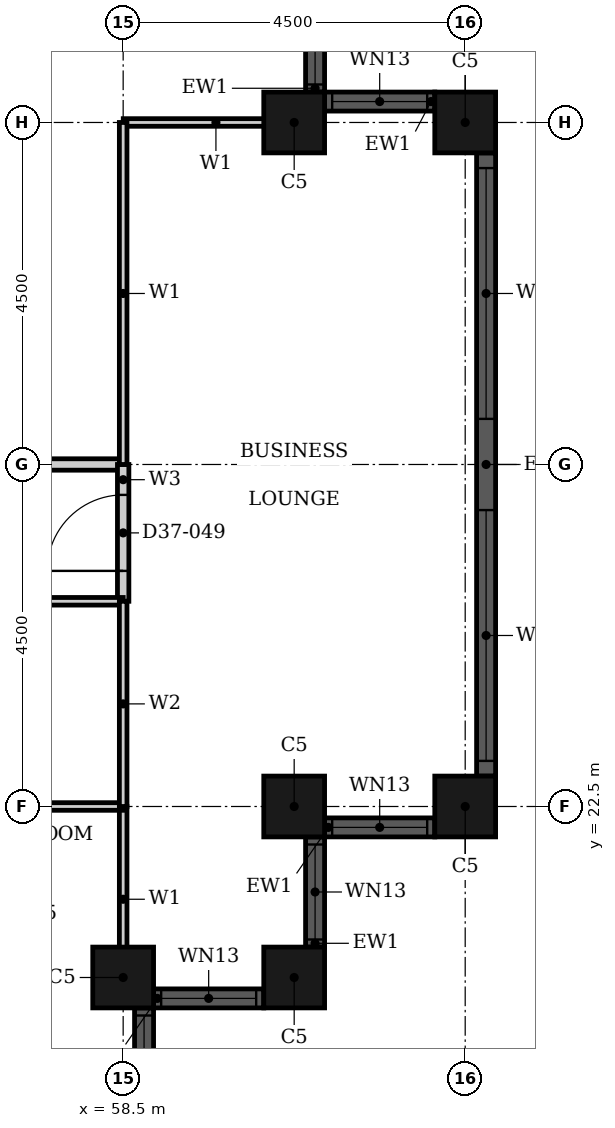
"""IFC4 building model, lengths in metres.
Left out: names, types, materials, properties, quantities, classifications, styles, units other than length and angle.
Written with IfcOpenShell. Run it as: python <this file> out.ifc"""

import sys

from ifc_helpers import new_model, si_unit, direction, frame, frame_2d, origin, origin_2d, place, context, subcontext, project, spatial, rectangle, hollow_rectangle, extrude, element, fill, save


model = new_model("IFC4")
c1 = context("Model", 3, precision=1e-05, world=origin(), true_north=direction((0.0, 1.0)))
c2 = subcontext(c1, "Body", "Model", "MODEL_VIEW")
j1 = project(units=[si_unit("LENGTHUNIT", "METRE"), si_unit("PLANEANGLEUNIT", "RADIAN")], contexts=[c1])
p1 = place(None, origin())
s1 = spatial("IfcSite", under=j1, at=p1, CompositionType="ELEMENT")
p2 = place(p1, origin())
s2 = spatial("IfcBuilding", under=s1, at=p2, CompositionType="ELEMENT")
p3 = place(p2, frame((0.0, 0.0, 150.6)))
s3 = spatial("IfcBuildingStorey", under=s2, at=p3, CompositionType="ELEMENT", Elevation=150.6)
for number, where, z_axis, x_axis in (
    (1, (58.5, 20.25, 0.0), (0.0, 0.0, 1.0), (1.0, 0.0, 0.0)),
    (2, (60.75, 20.25, 0.0), (0.0, 0.0, 1.0), (1.0, 0.0, 0.0)),
    (3, (60.75, 22.5, 0.0), (0.0, 0.0, 1.0), (1.0, 0.0, 0.0)),
    (4, (63.0, 22.5, 0.0), (0.0, 0.0, 1.0), (1.0, 0.0, 0.0)),
    (5, (63.0, 31.5, 0.0), (0.0, 0.0, 1.0), (1.0, 0.0, 0.0)),
    (6, (60.75, 31.5, 0.0), (0.0, 0.0, 1.0), (1.0, 0.0, 0.0)),
):
    element("IfcColumn", number, at=place(p3, frame(where, z_axis=z_axis, x_axis=x_axis)), inside=s3, PredefinedType="COLUMN", context=c2, shape_type="SweptSolid", body=[
        extrude(hollow_rectangle(XDim=0.8, YDim=0.8, WallThickness=0.025, at=origin_2d()), origin(), (0.0, 0.0, 1.0), 3.7),
    ])
p4 = place(p3, frame((58.775, 18.4, 0.0), z_axis=(0.0, 0.0, 1.0), x_axis=(0.0, 1.0, 0.0)))
e7 = element("IfcWall", 7, at=p4, inside=s3, PredefinedType="SOLIDWALL", context=c2, shape_type="SweptSolid", body=[
    extrude(rectangle(XDim=1.45, YDim=0.25, at=frame_2d((0.725, 0.0))), origin(), (0.0, 0.0, 1.0), 3.7),
])
p5 = place(p4, frame((0.1, 0.0, 0.9)))
e8 = element("IfcOpeningElement", 8, at=p5, cuts=e7, PredefinedType="OPENING", context=c2, shape_type="SweptSolid", body=[
    extrude(rectangle(XDim=1.25, YDim=1.85, at=frame_2d((0.625, 0.925))), frame((0.0, 0.135, 0.0), z_axis=(0.0, -1.0, 0.0), x_axis=(1.0, 0.0, 0.0)), (0.0, 0.0, 1.0), 0.27),
])
p6 = place(p3, frame((58.9, 19.975, 0.0), z_axis=(0.0, 0.0, 1.0), x_axis=(1.0, 0.0, 0.0)))
e9 = element("IfcWall", 9, at=p6, inside=s3, PredefinedType="SOLIDWALL", context=c2, shape_type="SweptSolid", body=[
    extrude(rectangle(XDim=1.45, YDim=0.25, at=frame_2d((0.725, 0.0))), origin(), (0.0, 0.0, 1.0), 3.7),
])
p7 = place(p6, frame((0.1, 0.0, 0.9)))
e10 = element("IfcOpeningElement", 10, at=p7, cuts=e9, PredefinedType="OPENING", context=c2, shape_type="SweptSolid", body=[
    extrude(rectangle(XDim=1.25, YDim=1.85, at=frame_2d((0.625, 0.925))), frame((0.0, 0.135, 0.0), z_axis=(0.0, -1.0, 0.0), x_axis=(1.0, 0.0, 0.0)), (0.0, 0.0, 1.0), 0.27),
])
p8 = place(p3, frame((61.025, 20.65, 0.0), z_axis=(0.0, 0.0, 1.0), x_axis=(0.0, 1.0, 0.0)))
e11 = element("IfcWall", 11, at=p8, inside=s3, PredefinedType="SOLIDWALL", context=c2, shape_type="SweptSolid", body=[
    extrude(rectangle(XDim=1.45, YDim=0.25, at=frame_2d((0.725, 0.0))), origin(), (0.0, 0.0, 1.0), 3.7),
])
p9 = place(p8, frame((0.1, 0.0, 0.9)))
e12 = element("IfcOpeningElement", 12, at=p9, cuts=e11, PredefinedType="OPENING", context=c2, shape_type="SweptSolid", body=[
    extrude(rectangle(XDim=1.25, YDim=1.85, at=frame_2d((0.625, 0.925))), frame((0.0, 0.135, 0.0), z_axis=(0.0, -1.0, 0.0), x_axis=(1.0, 0.0, 0.0)), (0.0, 0.0, 1.0), 0.27),
])
p10 = place(p3, frame((61.15, 22.225, 0.0), z_axis=(0.0, 0.0, 1.0), x_axis=(1.0, 0.0, 0.0)))
e13 = element("IfcWall", 13, at=p10, inside=s3, PredefinedType="SOLIDWALL", context=c2, shape_type="SweptSolid", body=[
    extrude(rectangle(XDim=1.45, YDim=0.25, at=frame_2d((0.725, 0.0))), origin(), (0.0, 0.0, 1.0), 3.7),
])
p11 = place(p10, frame((0.1, 0.0, 0.9)))
e14 = element("IfcOpeningElement", 14, at=p11, cuts=e13, PredefinedType="OPENING", context=c2, shape_type="SweptSolid", body=[
    extrude(rectangle(XDim=1.25, YDim=1.85, at=frame_2d((0.625, 0.925))), frame((0.0, 0.135, 0.0), z_axis=(0.0, -1.0, 0.0), x_axis=(1.0, 0.0, 0.0)), (0.0, 0.0, 1.0), 0.27),
])
p12 = place(p3, frame((63.275, 22.9, 0.0), z_axis=(0.0, 0.0, 1.0), x_axis=(0.0, 1.0, 0.0)))
e15 = element("IfcWall", 15, at=p12, inside=s3, PredefinedType="SOLIDWALL", context=c2, shape_type="SweptSolid", body=[
    extrude(rectangle(XDim=8.2, YDim=0.25, at=frame_2d((4.1, 0.0))), origin(), (0.0, 0.0, 1.0), 3.7),
])
p13 = place(p12, frame((0.2, 0.0, 0.45)))
e16 = element("IfcOpeningElement", 16, at=p13, cuts=e15, PredefinedType="OPENING", context=c2, shape_type="SweptSolid", body=[
    extrude(rectangle(XDim=3.3, YDim=2.3, at=frame_2d((1.65, 1.15))), frame((0.0, 0.135, 0.0), z_axis=(0.0, -1.0, 0.0), x_axis=(1.0, 0.0, 0.0)), (0.0, 0.0, 1.0), 0.27),
])
p14 = place(p12, frame((4.7, 0.0, 0.45)))
e17 = element("IfcOpeningElement", 17, at=p14, cuts=e15, PredefinedType="OPENING", context=c2, shape_type="SweptSolid", body=[
    extrude(rectangle(XDim=3.3, YDim=2.3, at=frame_2d((1.65, 1.15))), frame((0.0, 0.135, 0.0), z_axis=(0.0, -1.0, 0.0), x_axis=(1.0, 0.0, 0.0)), (0.0, 0.0, 1.0), 0.27),
])
p15 = place(p3, frame((62.6, 31.775, 0.0), z_axis=(0.0, 0.0, 1.0), x_axis=(-1.0, 0.0, 0.0)))
e18 = element("IfcWall", 18, at=p15, inside=s3, PredefinedType="SOLIDWALL", context=c2, shape_type="SweptSolid", body=[
    extrude(rectangle(XDim=1.45, YDim=0.25, at=frame_2d((0.725, 0.0))), origin(), (0.0, 0.0, 1.0), 3.7),
])
p16 = place(p15, frame((0.1, 0.0, 0.9)))
e19 = element("IfcOpeningElement", 19, at=p16, cuts=e18, PredefinedType="OPENING", context=c2, shape_type="SweptSolid", body=[
    extrude(rectangle(XDim=1.25, YDim=1.85, at=frame_2d((0.625, 0.925))), frame((0.0, 0.135, 0.0), z_axis=(0.0, -1.0, 0.0), x_axis=(1.0, 0.0, 0.0)), (0.0, 0.0, 1.0), 0.27),
])
p17 = place(p3, frame((61.025, 31.9, 0.0), z_axis=(0.0, 0.0, 1.0), x_axis=(0.0, 1.0, 0.0)))
e20 = element("IfcWall", 20, at=p17, inside=s3, PredefinedType="SOLIDWALL", context=c2, shape_type="SweptSolid", body=[
    extrude(rectangle(XDim=1.45, YDim=0.25, at=frame_2d((0.725, 0.0))), origin(), (0.0, 0.0, 1.0), 3.7),
])
p18 = place(p17, frame((0.1, 0.0, 0.9)))
e21 = element("IfcOpeningElement", 21, at=p18, cuts=e20, PredefinedType="OPENING", context=c2, shape_type="SweptSolid", body=[
    extrude(rectangle(XDim=1.25, YDim=1.85, at=frame_2d((0.625, 0.925))), frame((0.0, 0.135, 0.0), z_axis=(0.0, -1.0, 0.0), x_axis=(1.0, 0.0, 0.0)), (0.0, 0.0, 1.0), 0.27),
])
p19 = place(p3, frame((45.0, 27.0, 0.0), z_axis=(0.0, 0.0, 1.0), x_axis=(1.0, 0.0, 0.0)))
e22 = element("IfcWall", 22, at=p19, inside=s3, PredefinedType="PARTITIONING", context=c2, shape_type="SweptSolid", body=[
    extrude(rectangle(XDim=13.5, YDim=0.15, at=frame_2d((6.75, 0.0))), origin(), (0.0, 0.0, 1.0), 2.68),
])
p20 = place(p19, frame((7.15, 0.0, 0.0)))
e23 = element("IfcOpeningElement", 23, at=p20, cuts=e22, PredefinedType="OPENING", context=c2, shape_type="SweptSolid", body=[
    extrude(rectangle(XDim=1.0, YDim=2.1, at=frame_2d((0.5, 1.05))), frame((0.0, 0.085, 0.0), z_axis=(0.0, -1.0, 0.0), x_axis=(1.0, 0.0, 0.0)), (0.0, 0.0, 1.0), 0.17),
])
p21 = place(p3, frame((58.5, 25.2, 0.0), z_axis=(0.0, 0.0, 1.0), x_axis=(0.0, 1.0, 0.0)))
e24 = element("IfcWall", 24, at=p21, inside=s3, PredefinedType="PARTITIONING", context=c2, shape_type="SweptSolid", body=[
    extrude(rectangle(XDim=1.8, YDim=0.15, at=frame_2d((0.9, 0.0))), origin(), (0.0, 0.0, 1.0), 3.4),
])
p22 = place(p21, frame((0.4, 0.0, 0.0)))
e25 = element("IfcOpeningElement", 25, at=p22, cuts=e24, PredefinedType="OPENING", context=c2, shape_type="SweptSolid", body=[
    extrude(rectangle(XDim=1.0, YDim=2.1, at=frame_2d((0.5, 1.05))), frame((0.0, 0.085, 0.0), z_axis=(0.0, -1.0, 0.0), x_axis=(1.0, 0.0, 0.0)), (0.0, 0.0, 1.0), 0.17),
])
p23 = place(p3, frame((58.501, 31.5, 0.0), z_axis=(0.0, 0.0, 1.0), x_axis=(1.0, 0.0, 0.0)))
e26 = element("IfcWall", 26, at=p23, inside=s3, PredefinedType="PARTITIONING", context=c2, shape_type="SweptSolid", body=[
    extrude(rectangle(XDim=2.439, YDim=0.1, at=frame_2d((1.219, 0.0))), origin(), (0.0, 0.0, 1.0), 2.68),
])
p24 = place(p3, frame((58.5, 27.0, 0.0), z_axis=(0.0, 0.0, 1.0), x_axis=(0.0, 1.0, 0.0)))
e27 = element("IfcWall", 27, at=p24, inside=s3, PredefinedType="PARTITIONING", context=c2, shape_type="SweptSolid", body=[
    extrude(rectangle(XDim=4.5, YDim=0.1, at=frame_2d((2.25, 0.0))), origin(), (0.0, 0.0, 1.0), 3.4),
])
p25 = place(p3, frame((58.5, 20.06, 0.0), z_axis=(0.0, 0.0, 1.0), x_axis=(0.0, 1.0, 0.0)))
e28 = element("IfcWall", 28, at=p25, inside=s3, PredefinedType="PARTITIONING", context=c2, shape_type="SweptSolid", body=[
    extrude(rectangle(XDim=2.439, YDim=0.1, at=frame_2d((1.219, 0.0))), origin(), (0.0, 0.0, 1.0), 3.4),
])
p26 = place(p3, frame((56.1, 22.5, 0.0), z_axis=(0.0, 0.0, 1.0), x_axis=(1.0, 0.0, 0.0)))
e29 = element("IfcWall", 29, at=p26, inside=s3, PredefinedType="PARTITIONING", context=c2, shape_type="SweptSolid", body=[
    extrude(rectangle(XDim=2.4, YDim=0.1, at=frame_2d((1.2, 0.0))), origin(), (0.0, 0.0, 1.0), 2.68),
])
p27 = place(p3, frame((56.1, 25.2, 0.0), z_axis=(0.0, 0.0, 1.0), x_axis=(1.0, 0.0, 0.0)))
e30 = element("IfcWall", 30, at=p27, inside=s3, PredefinedType="PARTITIONING", context=c2, shape_type="SweptSolid", body=[
    extrude(rectangle(XDim=2.4, YDim=0.1, at=frame_2d((1.2, 0.0))), origin(), (0.0, 0.0, 1.0), 3.4),
])
p28 = place(p3, frame((58.5, 22.5, 0.0), z_axis=(0.0, 0.0, 1.0), x_axis=(0.0, 1.0, 0.0)))
e31 = element("IfcWall", 31, at=p28, inside=s3, PredefinedType="PARTITIONING", context=c2, shape_type="SweptSolid", body=[
    extrude(rectangle(XDim=2.7, YDim=0.1, at=frame_2d((1.35, 0.0))), origin(), (0.0, 0.0, 1.0), 3.4),
])
p29 = place(p5, origin())
e32 = element("IfcWindow", 32, at=p29, inside=s3, PartitioningType="SINGLE_PANEL", PredefinedType="WINDOW", context=c2, shape_type="SweptSolid", body=[
    extrude(rectangle(XDim=1.25, YDim=1.85, at=frame_2d((0.625, 0.925))), frame((0.0, 0.03, 0.0), z_axis=(0.0, -1.0, 0.0), x_axis=(1.0, 0.0, 0.0)), (0.0, 0.0, 1.0), 0.06),
])
fill(e8, e32)
p30 = place(p7, origin())
e33 = element("IfcWindow", 33, at=p30, inside=s3, PartitioningType="SINGLE_PANEL", PredefinedType="WINDOW", context=c2, shape_type="SweptSolid", body=[
    extrude(rectangle(XDim=1.25, YDim=1.85, at=frame_2d((0.625, 0.925))), frame((0.0, 0.03, 0.0), z_axis=(0.0, -1.0, 0.0), x_axis=(1.0, 0.0, 0.0)), (0.0, 0.0, 1.0), 0.06),
])
fill(e10, e33)
p31 = place(p9, origin())
e34 = element("IfcWindow", 34, at=p31, inside=s3, PartitioningType="SINGLE_PANEL", PredefinedType="WINDOW", context=c2, shape_type="SweptSolid", body=[
    extrude(rectangle(XDim=1.25, YDim=1.85, at=frame_2d((0.625, 0.925))), frame((0.0, 0.03, 0.0), z_axis=(0.0, -1.0, 0.0), x_axis=(1.0, 0.0, 0.0)), (0.0, 0.0, 1.0), 0.06),
])
fill(e12, e34)
p32 = place(p11, origin())
e35 = element("IfcWindow", 35, at=p32, inside=s3, PartitioningType="SINGLE_PANEL", PredefinedType="WINDOW", context=c2, shape_type="SweptSolid", body=[
    extrude(rectangle(XDim=1.25, YDim=1.85, at=frame_2d((0.625, 0.925))), frame((0.0, 0.03, 0.0), z_axis=(0.0, -1.0, 0.0), x_axis=(1.0, 0.0, 0.0)), (0.0, 0.0, 1.0), 0.06),
])
fill(e14, e35)
p33 = place(p13, origin())
e36 = element("IfcWindow", 36, at=p33, inside=s3, PartitioningType="SINGLE_PANEL", PredefinedType="WINDOW", context=c2, shape_type="SweptSolid", body=[
    extrude(rectangle(XDim=3.3, YDim=2.3, at=frame_2d((1.65, 1.15))), frame((0.0, 0.03, 0.0), z_axis=(0.0, -1.0, 0.0), x_axis=(1.0, 0.0, 0.0)), (0.0, 0.0, 1.0), 0.06),
])
fill(e16, e36)
p34 = place(p14, origin())
e37 = element("IfcWindow", 37, at=p34, inside=s3, PartitioningType="SINGLE_PANEL", PredefinedType="WINDOW", context=c2, shape_type="SweptSolid", body=[
    extrude(rectangle(XDim=3.3, YDim=2.3, at=frame_2d((1.65, 1.15))), frame((0.0, 0.03, 0.0), z_axis=(0.0, -1.0, 0.0), x_axis=(1.0, 0.0, 0.0)), (0.0, 0.0, 1.0), 0.06),
])
fill(e17, e37)
p35 = place(p16, origin())
e38 = element("IfcWindow", 38, at=p35, inside=s3, PartitioningType="SINGLE_PANEL", PredefinedType="WINDOW", context=c2, shape_type="SweptSolid", body=[
    extrude(rectangle(XDim=1.25, YDim=1.85, at=frame_2d((0.625, 0.925))), frame((0.0, 0.03, 0.0), z_axis=(0.0, -1.0, 0.0), x_axis=(1.0, 0.0, 0.0)), (0.0, 0.0, 1.0), 0.06),
])
fill(e19, e38)
p36 = place(p18, origin())
e39 = element("IfcWindow", 39, at=p36, inside=s3, PartitioningType="SINGLE_PANEL", PredefinedType="WINDOW", context=c2, shape_type="SweptSolid", body=[
    extrude(rectangle(XDim=1.25, YDim=1.85, at=frame_2d((0.625, 0.925))), frame((0.0, 0.03, 0.0), z_axis=(0.0, -1.0, 0.0), x_axis=(1.0, 0.0, 0.0)), (0.0, 0.0, 1.0), 0.06),
])
fill(e21, e39)
p37 = place(p22, origin())
e40 = element("IfcDoor", 40, at=p37, inside=s3, OperationType="SINGLE_SWING_LEFT", PredefinedType="DOOR", context=c2, shape_type="SweptSolid", body=[
    extrude(rectangle(XDim=1.0, YDim=2.1, at=frame_2d((0.5, 1.05))), frame((0.0, 0.025, 0.0), z_axis=(0.0, -1.0, 0.0), x_axis=(1.0, 0.0, 0.0)), (0.0, 0.0, 1.0), 0.05),
])
fill(e25, e40)
save(model, sys.argv[1])
